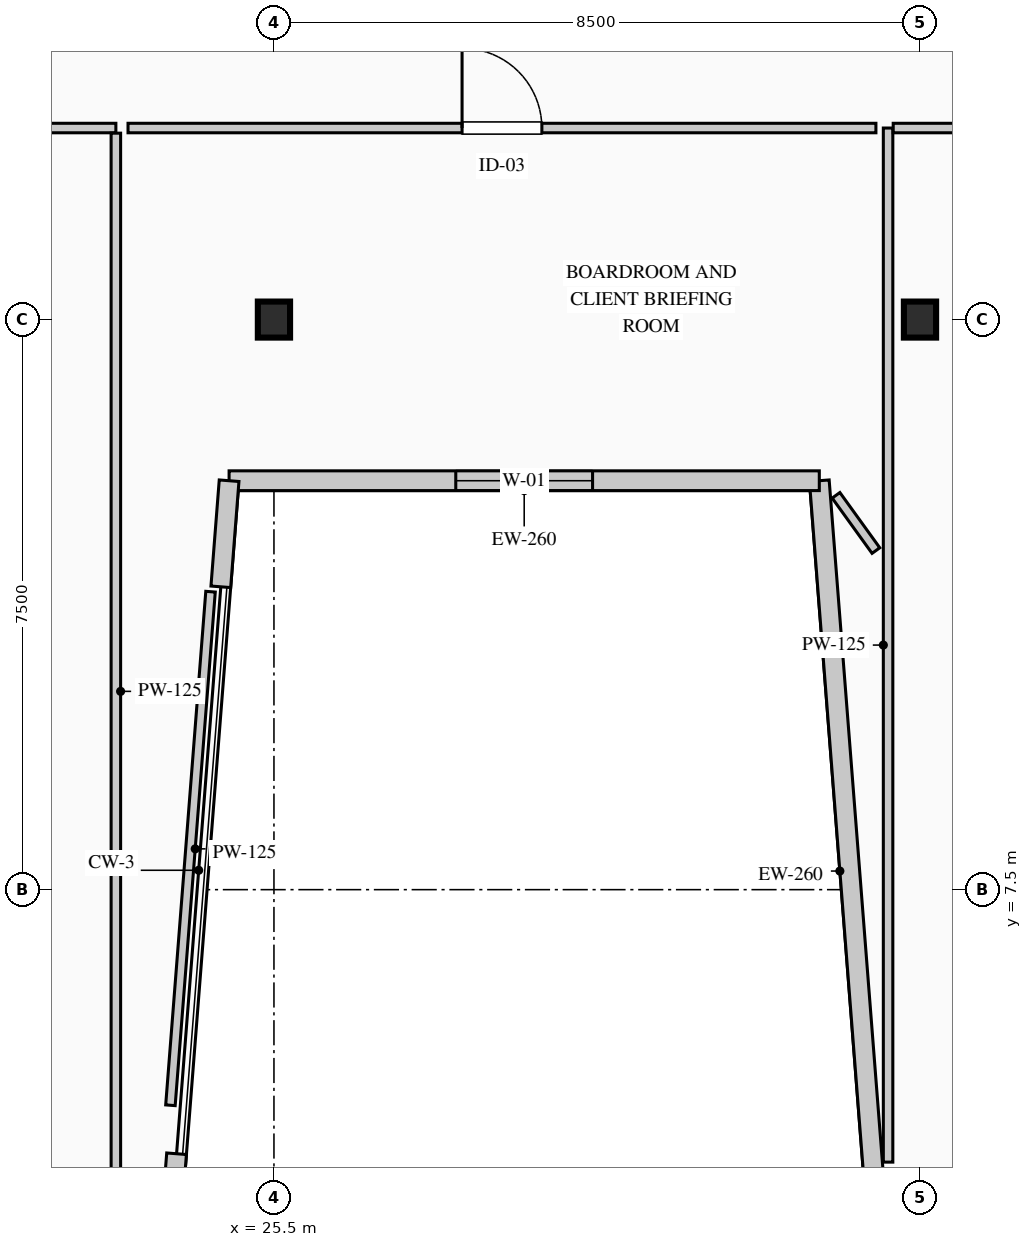
"""IFC4 building model, lengths in metres.
Left out: names, types, materials, properties, quantities, classifications, styles, units other than length and angle.
Written with IfcOpenShell. Run it as: python <this file> out.ifc"""

import sys

from ifc_helpers import new_model, si_unit, direction, frame, frame_2d, origin, origin_2d, place, context, subcontext, project, spatial, rectangle, i_section, extrude, element, fill, save


model = new_model("IFC4")
c1 = context("Model", 3, precision=1e-05, world=origin(), true_north=direction((0.0, 1.0)))
c2 = subcontext(c1, "Body", "Model", "MODEL_VIEW")
j1 = project(units=[si_unit("LENGTHUNIT", "METRE"), si_unit("PLANEANGLEUNIT", "RADIAN")], contexts=[c1])
p1 = place(None, origin())
s1 = spatial("IfcSite", under=j1, at=p1, CompositionType="ELEMENT")
p2 = place(p1, origin())
s2 = spatial("IfcBuilding", under=s1, at=p2, CompositionType="ELEMENT")
p3 = place(p2, frame((0.0, 0.0, 123.25)))
s3 = spatial("IfcBuildingStorey", under=s2, at=p3, CompositionType="ELEMENT", Elevation=123.25)
for number, where, z_axis, x_axis in (
    (1, (25.5, 15.0, 0.0), (0.0, 0.0, 1.0), (1.0, 0.0, 0.0)),
    (2, (34.0, 15.0, 0.0), (0.0, 0.0, 1.0), (1.0, 0.0, 0.0)),
):
    element("IfcColumn", number, at=place(p3, frame(where, z_axis=z_axis, x_axis=x_axis)), inside=s3, PredefinedType="COLUMN", context=c2, shape_type="SweptSolid", body=[
        extrude(i_section(OverallWidth=0.424, OverallDepth=0.474, WebThickness=0.048, FlangeThickness=0.077, FilletRadius=0.015, at=origin_2d()), origin(), (0.0, 0.0, 1.0), 3.95),
    ])
p4 = place(p3, frame((33.475, 2.63, 0.0), z_axis=(0.0, 0.0, 1.0), x_axis=(-0.077793257511, 0.996969512616, 0.0)))
e3 = element("IfcWall", 3, at=p4, inside=s3, PredefinedType="STANDARD", context=c2, shape_type="SweptSolid", body=[
    extrude(rectangle(XDim=10.281, YDim=0.26, at=frame_2d((5.141, 0.0))), origin(), (0.0, 0.0, 1.0), 3.69),
])
p5 = place(p3, frame((32.675, 12.88, 0.0), z_axis=(0.0, 0.0, 1.0), x_axis=(-1.0, 0.0, 0.0)))
e4 = element("IfcWall", 4, at=p5, inside=s3, PredefinedType="STANDARD", context=c2, shape_type="SweptSolid", body=[
    extrude(rectangle(XDim=7.765, YDim=0.26, at=frame_2d((3.883, 0.0))), origin(), (0.0, 0.0, 1.0), 3.69),
])
p6 = place(p5, frame((2.983, 0.0, 0.9)))
e5 = element("IfcOpeningElement", 5, at=p6, cuts=e4, PredefinedType="OPENING", context=c2, shape_type="SweptSolid", body=[
    extrude(rectangle(XDim=1.8, YDim=2.1, at=frame_2d((0.9, 1.05))), frame((0.0, 0.14, 0.0), z_axis=(0.0, -1.0, 0.0), x_axis=(1.0, 0.0, 0.0)), (0.0, 0.0, 1.0), 0.28),
])
for number, where, z_axis, x_axis in (
    (6, (24.91, 12.88, 0.0), (0.0, 0.0, 1.0), (-0.078, -0.997, 0.0)),
    (7, (24.219, 4.026, 0.0), (0.0, 0.0, 1.0), (-0.078, -0.997, 0.0)),
):
    element("IfcWall", number, at=place(p3, frame(where, z_axis=z_axis, x_axis=x_axis)), inside=s3, PredefinedType="STANDARD", context=c2, shape_type="SweptSolid", body=[
        extrude(rectangle(XDim=1.4, YDim=0.26, at=frame_2d((0.7, 0.0))), origin(), (0.0, 0.0, 1.0), 3.69),
    ])
p7 = place(p3, frame((12.58, 17.52, 0.0), z_axis=(0.0, 0.0, 1.0), x_axis=(1.0, 0.0, 0.0)))
e8 = element("IfcWall", 8, at=p7, inside=s3, PredefinedType="PARTITIONING", context=c2, shape_type="SweptSolid", body=[
    extrude(rectangle(XDim=10.84, YDim=0.125, at=frame_2d((5.42, 0.0))), origin(), (0.0, 0.0, 1.0), 3.69),
])
p8 = place(p7, frame((4.895, 0.0, 0.0)))
e9 = element("IfcOpeningElement", 9, at=p8, cuts=e8, PredefinedType="OPENING", context=c2, shape_type="SweptSolid", body=[
    extrude(rectangle(XDim=1.05, YDim=2.15, at=frame_2d((0.525, 1.075))), frame((0.0, 0.073, 0.0), z_axis=(0.0, -1.0, 0.0), x_axis=(1.0, 0.0, 0.0)), (0.0, 0.0, 1.0), 0.145),
])
p9 = place(p3, frame((23.42, 17.452, 0.0), z_axis=(0.0, 0.0, 1.0), x_axis=(0.0, -1.0, 0.0)))
e10 = element("IfcWall", 10, at=p9, inside=s3, PredefinedType="PARTITIONING", context=c2, shape_type="SweptSolid", body=[
    extrude(rectangle(XDim=14.688, YDim=0.125, at=frame_2d((7.344, 0.0))), origin(), (0.0, 0.0, 1.0), 3.69),
])
p10 = place(p3, frame((33.58, 3.915, 0.0), z_axis=(0.0, 0.0, 1.0), x_axis=(0.0, 1.0, 0.0)))
e11 = element("IfcWall", 11, at=p10, inside=s3, PredefinedType="PARTITIONING", context=c2, shape_type="SweptSolid", body=[
    extrude(rectangle(XDim=13.605, YDim=0.125, at=frame_2d((6.802, 0.0))), origin(), (0.0, 0.0, 1.0), 3.69),
])
p11 = place(p3, frame((33.647, 17.52, 0.0), z_axis=(0.0, 0.0, 1.0), x_axis=(1.0, 0.0, 0.0)))
e12 = element("IfcWall", 12, at=p11, inside=s3, PredefinedType="PARTITIONING", context=c2, shape_type="SweptSolid", body=[
    extrude(rectangle(XDim=8.772, YDim=0.125, at=frame_2d((4.386, 0.0))), origin(), (0.0, 0.0, 1.0), 3.375),
])
p12 = place(p11, frame((3.861, 0.0, 0.0)))
e13 = element("IfcOpeningElement", 13, at=p12, cuts=e12, PredefinedType="OPENING", context=c2, shape_type="SweptSolid", body=[
    extrude(rectangle(XDim=1.05, YDim=2.15, at=frame_2d((0.525, 1.075))), frame((0.0, 0.073, 0.0), z_axis=(0.0, -1.0, 0.0), x_axis=(1.0, 0.0, 0.0)), (0.0, 0.0, 1.0), 0.145),
])
p13 = place(p3, frame((33.42, 11.961, 0.0), z_axis=(0.0, 0.0, 1.0), x_axis=(-0.58517236533, 0.810908936228, 0.0)))
e14 = element("IfcWall", 14, at=p13, inside=s3, PredefinedType="PARTITIONING", context=c2, shape_type="SweptSolid", body=[
    extrude(rectangle(XDim=0.896, YDim=0.125, at=frame_2d((0.448, 0.0))), origin(), (0.0, 0.0, 1.0), 3.69),
])
p14 = place(p3, frame((24.666, 11.42, 0.0), z_axis=(0.0, 0.0, 1.0), x_axis=(-0.077847945506, -0.996965243818, 0.0)))
e15 = element("IfcWall", 15, at=p14, inside=s3, PredefinedType="PARTITIONING", context=c2, shape_type="SweptSolid", body=[
    extrude(rectangle(XDim=6.777, YDim=0.125, at=frame_2d((3.389, 0.0))), origin(), (0.0, 0.0, 1.0), 3.69),
])
p15 = place(p3, frame((23.58, 17.52, 0.0), z_axis=(0.0, 0.0, 1.0), x_axis=(1.0, 0.0, 0.0)))
e16 = element("IfcWall", 16, at=p15, inside=s3, PredefinedType="PARTITIONING", context=c2, shape_type="SweptSolid", body=[
    extrude(rectangle(XDim=9.84, YDim=0.125, at=frame_2d((4.92, 0.0))), origin(), (0.0, 0.0, 1.0), 3.375),
])
p16 = place(p15, frame((4.395, 0.0, 0.0)))
e17 = element("IfcOpeningElement", 17, at=p16, cuts=e16, PredefinedType="OPENING", context=c2, shape_type="SweptSolid", body=[
    extrude(rectangle(XDim=1.05, YDim=2.15, at=frame_2d((0.525, 1.075))), frame((0.0, 0.073, 0.0), z_axis=(0.0, -1.0, 0.0), x_axis=(1.0, 0.0, 0.0)), (0.0, 0.0, 1.0), 0.145),
])
p17 = place(p6, origin())
e18 = element("IfcWindow", 18, at=p17, inside=s3, PartitioningType="SINGLE_PANEL", PredefinedType="WINDOW", context=c2, shape_type="SweptSolid", body=[
    extrude(rectangle(XDim=1.8, YDim=2.1, at=frame_2d((0.9, 1.05))), frame((0.0, 0.03, 0.0), z_axis=(0.0, -1.0, 0.0), x_axis=(1.0, 0.0, 0.0)), (0.0, 0.0, 1.0), 0.06),
])
fill(e5, e18)
p18 = place(p16, origin())
e19 = element("IfcDoor", 19, at=p18, inside=s3, OperationType="SINGLE_SWING_LEFT", PredefinedType="DOOR", context=c2, shape_type="SweptSolid", body=[
    extrude(rectangle(XDim=1.05, YDim=2.15, at=frame_2d((0.525, 1.075))), frame((0.0, 0.025, 0.0), z_axis=(0.0, -1.0, 0.0), x_axis=(1.0, 0.0, 0.0)), (0.0, 0.0, 1.0), 0.05),
])
fill(e17, e19)
save(model, sys.argv[1])
